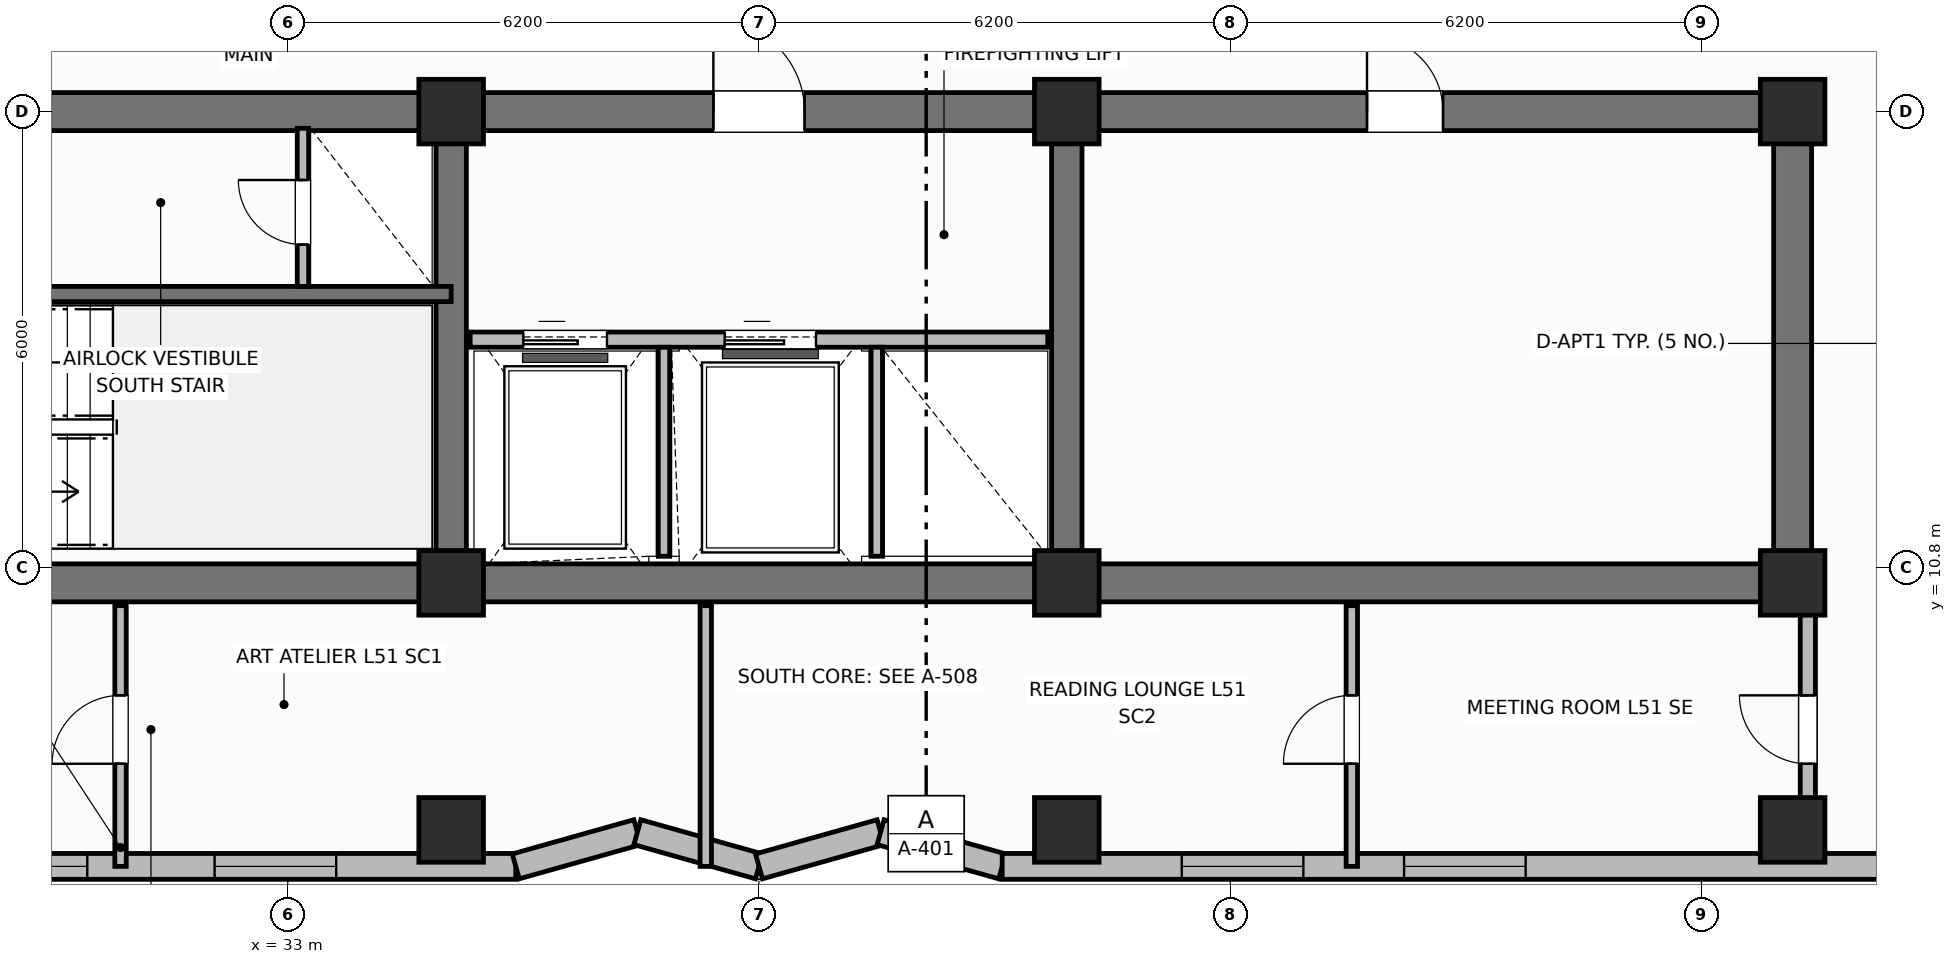
"""IFC4 building model, lengths in metres.
Left out: names, types, materials, properties, quantities, classifications, styles, units other than length and angle.
Written with IfcOpenShell. Run it as: python <this file> out.ifc"""

import sys

from ifc_helpers import new_model, si_unit, direction, frame, frame_2d, origin, origin_2d, place, context, subcontext, project, spatial, rectangle, extrude, element, fill, save


model = new_model("IFC4")
c1 = context("Model", 3, precision=1e-05, world=origin(), true_north=direction((0.0, 1.0)))
c2 = subcontext(c1, "Body", "Model", "MODEL_VIEW")
j1 = project(units=[si_unit("LENGTHUNIT", "METRE"), si_unit("PLANEANGLEUNIT", "RADIAN")], contexts=[c1])
p1 = place(None, origin())
s1 = spatial("IfcSite", under=j1, at=p1, CompositionType="ELEMENT")
p2 = place(p1, origin())
s2 = spatial("IfcBuilding", under=s1, at=p2, CompositionType="ELEMENT")
p3 = place(p2, frame((0.0, 0.0, 207.3)))
s3 = spatial("IfcBuildingStorey", under=s2, at=p3, CompositionType="ELEMENT", Elevation=207.3)
p4 = place(p3, frame((52.8, 10.6, 0.0), z_axis=(0.0, 0.0, 1.0), x_axis=(-1.0, 0.0, 0.0)))
e1 = element("IfcWall", 1, at=p4, inside=s3, PredefinedType="SHEAR", context=c2, shape_type="SweptSolid", body=[
    extrude(rectangle(XDim=27.2, YDim=0.5, at=frame_2d((13.6, 0.0))), origin(), (0.0, 0.0, 1.0), 3.7),
])
p5 = place(p3, frame((52.8, 10.85, 0.0), z_axis=(0.0, 0.0, 1.0), x_axis=(0.0, 1.0, 0.0)))
e2 = element("IfcWall", 2, at=p5, inside=s3, PredefinedType="SHEAR", context=c2, shape_type="SweptSolid", body=[
    extrude(rectangle(XDim=5.7, YDim=0.5, at=frame_2d((2.85, 0.0))), origin(), (0.0, 0.0, 1.0), 3.7),
])
p6 = place(p3, frame((25.6, 16.8, 0.0), z_axis=(0.0, 0.0, 1.0), x_axis=(1.0, 0.0, 0.0)))
e3 = element("IfcWall", 3, at=p6, inside=s3, PredefinedType="SHEAR", context=c2, shape_type="SweptSolid", body=[
    extrude(rectangle(XDim=27.2, YDim=0.5, at=frame_2d((13.6, 0.0))), origin(), (0.0, 0.0, 1.0), 3.7),
])
p7 = place(p6, frame((1.9, 0.0, 0.0)))
e4 = element("IfcOpeningElement", 4, at=p7, cuts=e3, PredefinedType="OPENING", context=c2, shape_type="SweptSolid", body=[
    extrude(rectangle(XDim=1.1, YDim=2.15, at=frame_2d((0.55, 1.075))), frame((0.0, 0.26, 0.0), z_axis=(0.0, -1.0, 0.0), x_axis=(1.0, 0.0, 0.0)), (0.0, 0.0, 1.0), 0.52),
])
p8 = place(p6, frame((13.0, 0.0, 0.0)))
e5 = element("IfcOpeningElement", 5, at=p8, cuts=e3, PredefinedType="OPENING", context=c2, shape_type="SweptSolid", body=[
    extrude(rectangle(XDim=1.2, YDim=2.15, at=frame_2d((0.6, 1.075))), frame((0.0, 0.26, 0.0), z_axis=(0.0, -1.0, 0.0), x_axis=(1.0, 0.0, 0.0)), (0.0, 0.0, 1.0), 0.52),
])
p9 = place(p6, frame((21.6, 0.0, 0.0)))
e6 = element("IfcOpeningElement", 6, at=p9, cuts=e3, PredefinedType="OPENING", context=c2, shape_type="SweptSolid", body=[
    extrude(rectangle(XDim=1.0, YDim=2.15, at=frame_2d((0.5, 1.075))), frame((0.0, 0.26, 0.0), z_axis=(0.0, -1.0, 0.0), x_axis=(1.0, 0.0, 0.0)), (0.0, 0.0, 1.0), 0.52),
])
for number, where, z_axis, x_axis in (
    (7, (35.15, 10.85, 0.0), (0.0, 0.0, 1.0), (0.0, 1.0, 0.0)),
    (8, (43.25, 10.85, 0.0), (0.0, 0.0, 1.0), (0.0, 1.0, 0.0)),
):
    element("IfcWall", number, at=place(p3, frame(where, z_axis=z_axis, x_axis=x_axis)), inside=s3, PredefinedType="SHEAR", context=c2, shape_type="SweptSolid", body=[
        extrude(rectangle(XDim=5.7, YDim=0.4, at=frame_2d((2.85, 0.0))), origin(), (0.0, 0.0, 1.0), 3.7),
    ])
for number, where, z_axis, x_axis in (
    (9, (35.15, 10.6, 0.0), (0.0, 0.0, 1.0), (1.0, 0.0, 0.0)),
    (10, (35.15, 16.8, 0.0), (0.0, 0.0, 1.0), (1.0, 0.0, 0.0)),
    (11, (43.25, 10.6, 0.0), (0.0, 0.0, 1.0), (1.0, 0.0, 0.0)),
    (12, (43.25, 16.8, 0.0), (0.0, 0.0, 1.0), (1.0, 0.0, 0.0)),
    (13, (52.8, 10.6, 0.0), (0.0, 0.0, 1.0), (1.0, 0.0, 0.0)),
    (14, (52.8, 16.8, 0.0), (0.0, 0.0, 1.0), (1.0, 0.0, 0.0)),
    (15, (35.15, 7.35, 0.0), (0.0, 0.0, 1.0), (1.0, 0.0, 0.0)),
    (16, (43.25, 7.35, 0.0), (0.0, 0.0, 1.0), (1.0, 0.0, 0.0)),
    (17, (52.8, 7.35, 0.0), (0.0, 0.0, 1.0), (1.0, 0.0, 0.0)),
):
    element("IfcColumn", number, at=place(p3, frame(where, z_axis=z_axis, x_axis=x_axis)), inside=s3, PredefinedType="COLUMN", context=c2, shape_type="SweptSolid", body=[
        extrude(rectangle(XDim=0.85, YDim=0.85, at=origin_2d()), origin(), (0.0, 0.0, 1.0), 3.7),
    ])
p10 = place(p3, frame((20.2, 6.87, 0.0), z_axis=(0.0, 0.0, 1.0), x_axis=(1.0, 0.0, 0.0)))
e18 = element("IfcWall", 18, at=p10, inside=s3, PredefinedType="SOLIDWALL", context=c2, shape_type="SweptSolid", body=[
    extrude(rectangle(XDim=15.8, YDim=0.34, at=frame_2d((7.9, 0.0))), origin(), (0.0, 0.0, 1.0), 2.72),
])
p11 = place(p10, frame((0.962, 0.0, 0.7)))
e19 = element("IfcOpeningElement", 19, at=p11, cuts=e18, PredefinedType="OPENING", context=c2, shape_type="SweptSolid", body=[
    extrude(rectangle(XDim=1.6, YDim=1.9, at=frame_2d((0.8, 0.95))), frame((0.0, 0.18, 0.0), z_axis=(0.0, -1.0, 0.0), x_axis=(1.0, 0.0, 0.0)), (0.0, 0.0, 1.0), 0.36),
])
p12 = place(p10, frame((8.562, 0.0, 0.7)))
e20 = element("IfcOpeningElement", 20, at=p12, cuts=e18, PredefinedType="OPENING", context=c2, shape_type="SweptSolid", body=[
    extrude(rectangle(XDim=1.6, YDim=1.9, at=frame_2d((0.8, 0.95))), frame((0.0, 0.18, 0.0), z_axis=(0.0, -1.0, 0.0), x_axis=(1.0, 0.0, 0.0)), (0.0, 0.0, 1.0), 0.36),
])
p13 = place(p10, frame((11.837, 0.0, 0.7)))
e21 = element("IfcOpeningElement", 21, at=p13, cuts=e18, PredefinedType="OPENING", context=c2, shape_type="SweptSolid", body=[
    extrude(rectangle(XDim=1.6, YDim=1.9, at=frame_2d((0.8, 0.95))), frame((0.0, 0.18, 0.0), z_axis=(0.0, -1.0, 0.0), x_axis=(1.0, 0.0, 0.0)), (0.0, 0.0, 1.0), 0.36),
])
p14 = place(p3, frame((36.0, 6.87, 0.0), z_axis=(0.0, 0.0, 1.0), x_axis=(0.962662902433, 0.270703040766, 0.0)))
e22 = element("IfcWall", 22, at=p14, inside=s3, PredefinedType="SOLIDWALL", context=c2, shape_type="SweptSolid", body=[
    extrude(rectangle(XDim=1.662, YDim=0.34, at=frame_2d((0.831, 0.0))), origin(), (0.0, 0.0, 1.0), 2.72),
])
p15 = place(p3, frame((37.6, 7.32, 0.0), z_axis=(0.0, 0.0, 1.0), x_axis=(0.962652136636, -0.270741322725, 0.0)))
e23 = element("IfcWall", 23, at=p15, inside=s3, PredefinedType="SOLIDWALL", context=c2, shape_type="SweptSolid", body=[
    extrude(rectangle(XDim=1.662, YDim=0.34, at=frame_2d((0.831, 0.0))), origin(), (0.0, 0.0, 1.0), 2.72),
])
p16 = place(p3, frame((39.2, 6.87, 0.0), z_axis=(0.0, 0.0, 1.0), x_axis=(0.962662902433, 0.270703040766, 0.0)))
e24 = element("IfcWall", 24, at=p16, inside=s3, PredefinedType="SOLIDWALL", context=c2, shape_type="SweptSolid", body=[
    extrude(rectangle(XDim=1.662, YDim=0.34, at=frame_2d((0.831, 0.0))), origin(), (0.0, 0.0, 1.0), 2.72),
])
p17 = place(p3, frame((40.8, 7.32, 0.0), z_axis=(0.0, 0.0, 1.0), x_axis=(0.962652136636, -0.270741322725, 0.0)))
e25 = element("IfcWall", 25, at=p17, inside=s3, PredefinedType="SOLIDWALL", context=c2, shape_type="SweptSolid", body=[
    extrude(rectangle(XDim=1.662, YDim=0.34, at=frame_2d((0.831, 0.0))), origin(), (0.0, 0.0, 1.0), 2.72),
])
p18 = place(p3, frame((42.4, 6.87, 0.0), z_axis=(0.0, 0.0, 1.0), x_axis=(1.0, 0.0, 0.0)))
e26 = element("IfcWall", 26, at=p18, inside=s3, PredefinedType="SOLIDWALL", context=c2, shape_type="SweptSolid", body=[
    extrude(rectangle(XDim=15.8, YDim=0.34, at=frame_2d((7.9, 0.0))), origin(), (0.0, 0.0, 1.0), 2.72),
])
p19 = place(p18, frame((2.363, 0.0, 0.7)))
e27 = element("IfcOpeningElement", 27, at=p19, cuts=e26, PredefinedType="OPENING", context=c2, shape_type="SweptSolid", body=[
    extrude(rectangle(XDim=1.6, YDim=1.9, at=frame_2d((0.8, 0.95))), frame((0.0, 0.18, 0.0), z_axis=(0.0, -1.0, 0.0), x_axis=(1.0, 0.0, 0.0)), (0.0, 0.0, 1.0), 0.36),
])
p20 = place(p18, frame((5.288, 0.0, 0.7)))
e28 = element("IfcOpeningElement", 28, at=p20, cuts=e26, PredefinedType="OPENING", context=c2, shape_type="SweptSolid", body=[
    extrude(rectangle(XDim=1.6, YDim=1.9, at=frame_2d((0.8, 0.95))), frame((0.0, 0.18, 0.0), z_axis=(0.0, -1.0, 0.0), x_axis=(1.0, 0.0, 0.0)), (0.0, 0.0, 1.0), 0.36),
])
p21 = place(p18, frame((13.238, 0.0, 0.7)))
e29 = element("IfcOpeningElement", 29, at=p21, cuts=e26, PredefinedType="OPENING", context=c2, shape_type="SweptSolid", body=[
    extrude(rectangle(XDim=1.6, YDim=1.9, at=frame_2d((0.8, 0.95))), frame((0.0, 0.18, 0.0), z_axis=(0.0, -1.0, 0.0), x_axis=(1.0, 0.0, 0.0)), (0.0, 0.0, 1.0), 0.36),
])
p22 = place(p3, frame((25.6, 14.4, 0.0), z_axis=(0.0, 0.0, 1.0), x_axis=(1.0, 0.0, 0.0)))
e30 = element("IfcWall", 30, at=p22, inside=s3, PredefinedType="SHEAR", context=c2, shape_type="SweptSolid", body=[
    extrude(rectangle(XDim=9.55, YDim=0.2, at=frame_2d((4.775, 0.0))), origin(), (0.0, 0.0, 1.0), 3.7),
])
p23 = place(p22, frame((1.05, 0.0, 0.0)))
e31 = element("IfcOpeningElement", 31, at=p23, cuts=e30, PredefinedType="OPENING", context=c2, shape_type="SweptSolid", body=[
    extrude(rectangle(XDim=1.1, YDim=2.15, at=frame_2d((0.55, 1.075))), frame((0.0, 0.11, 0.0), z_axis=(0.0, -1.0, 0.0), x_axis=(1.0, 0.0, 0.0)), (0.0, 0.0, 1.0), 0.22),
])
p24 = place(p3, frame((33.2, 14.5, 0.0), z_axis=(0.0, 0.0, 1.0), x_axis=(0.0, 1.0, 0.0)))
e32 = element("IfcWall", 32, at=p24, inside=s3, PredefinedType="PARTITIONING", context=c2, shape_type="SweptSolid", body=[
    extrude(rectangle(XDim=2.08, YDim=0.15, at=frame_2d((1.04, 0.0))), origin(), (0.0, 0.0, 1.0), 2.55),
])
p25 = place(p24, frame((0.55, 0.0, 0.0)))
e33 = element("IfcOpeningElement", 33, at=p25, cuts=e32, PredefinedType="OPENING", context=c2, shape_type="SweptSolid", body=[
    extrude(rectangle(XDim=0.85, YDim=2.05, at=frame_2d((0.425, 1.025))), frame((0.0, 0.085, 0.0), z_axis=(0.0, -1.0, 0.0), x_axis=(1.0, 0.0, 0.0)), (0.0, 0.0, 1.0), 0.17),
])
p26 = place(p3, frame((35.4, 13.8, 0.0), z_axis=(0.0, 0.0, 1.0), x_axis=(1.0, 0.0, 0.0)))
e34 = element("IfcWall", 34, at=p26, inside=s3, PredefinedType="PARTITIONING", context=c2, shape_type="SweptSolid", body=[
    extrude(rectangle(XDim=7.6, YDim=0.2, at=frame_2d((3.8, 0.0))), origin(), (0.0, 0.0, 1.0), 2.32),
])
p27 = place(p26, frame((0.7, 0.0, 0.0)))
e35 = element("IfcOpeningElement", 35, at=p27, cuts=e34, PredefinedType="OPENING", context=c2, shape_type="SweptSolid", body=[
    extrude(rectangle(XDim=1.1, YDim=2.15, at=frame_2d((0.55, 1.075))), frame((0.0, 0.11, 0.0), z_axis=(0.0, -1.0, 0.0), x_axis=(1.0, 0.0, 0.0)), (0.0, 0.0, 1.0), 0.22),
])
p28 = place(p26, frame((3.35, 0.0, 0.0)))
e36 = element("IfcOpeningElement", 36, at=p28, cuts=e34, PredefinedType="OPENING", context=c2, shape_type="SweptSolid", body=[
    extrude(rectangle(XDim=1.2, YDim=2.15, at=frame_2d((0.6, 1.075))), frame((0.0, 0.11, 0.0), z_axis=(0.0, -1.0, 0.0), x_axis=(1.0, 0.0, 0.0)), (0.0, 0.0, 1.0), 0.22),
])
for number, where, z_axis, x_axis in (
    (37, (37.95, 10.95, 0.0), (0.0, 0.0, 1.0), (0.0, 1.0, 0.0)),
    (38, (40.75, 10.95, 0.0), (0.0, 0.0, 1.0), (0.0, 1.0, 0.0)),
):
    element("IfcWall", number, at=place(p3, frame(where, z_axis=z_axis, x_axis=x_axis)), inside=s3, PredefinedType="PARTITIONING", context=c2, shape_type="SweptSolid", body=[
        extrude(rectangle(XDim=2.75, YDim=0.15, at=frame_2d((1.375, 0.0))), origin(), (0.0, 0.0, 1.0), 2.55),
    ])
p29 = place(p3, frame((30.8, 6.87, 0.0), z_axis=(0.0, 0.0, 1.0), x_axis=(0.0, 1.0, 0.0)))
e39 = element("IfcWall", 39, at=p29, inside=s3, PredefinedType="PARTITIONING", context=c2, shape_type="SweptSolid", body=[
    extrude(rectangle(XDim=3.43, YDim=0.15, at=frame_2d((1.715, 0.0))), origin(), (0.0, 0.0, 1.0), 2.55),
])
p30 = place(p29, frame((1.35, 0.0, 0.0)))
e40 = element("IfcOpeningElement", 40, at=p30, cuts=e39, PredefinedType="OPENING", context=c2, shape_type="SweptSolid", body=[
    extrude(rectangle(XDim=0.9, YDim=2.1, at=frame_2d((0.45, 1.05))), frame((0.0, 0.085, 0.0), z_axis=(0.0, -1.0, 0.0), x_axis=(1.0, 0.0, 0.0)), (0.0, 0.0, 1.0), 0.17),
])
p31 = place(p3, frame((38.5, 6.87, 0.0), z_axis=(0.0, 0.0, 1.0), x_axis=(0.0, 1.0, 0.0)))
e41 = element("IfcWall", 41, at=p31, inside=s3, PredefinedType="PARTITIONING", context=c2, shape_type="SweptSolid", body=[
    extrude(rectangle(XDim=3.43, YDim=0.15, at=frame_2d((1.715, 0.0))), origin(), (0.0, 0.0, 1.0), 2.55),
])
p32 = place(p3, frame((47.0, 6.87, 0.0), z_axis=(0.0, 0.0, 1.0), x_axis=(0.0, 1.0, 0.0)))
e42 = element("IfcWall", 42, at=p32, inside=s3, PredefinedType="PARTITIONING", context=c2, shape_type="SweptSolid", body=[
    extrude(rectangle(XDim=3.43, YDim=0.15, at=frame_2d((1.715, 0.0))), origin(), (0.0, 0.0, 1.0), 2.55),
])
p33 = place(p32, frame((1.35, 0.0, 0.0)))
e43 = element("IfcOpeningElement", 43, at=p33, cuts=e42, PredefinedType="OPENING", context=c2, shape_type="SweptSolid", body=[
    extrude(rectangle(XDim=0.9, YDim=2.1, at=frame_2d((0.45, 1.05))), frame((0.0, 0.085, 0.0), z_axis=(0.0, -1.0, 0.0), x_axis=(1.0, 0.0, 0.0)), (0.0, 0.0, 1.0), 0.17),
])
p34 = place(p3, frame((53.0, 7.57, 0.0), z_axis=(0.0, 0.0, 1.0), x_axis=(0.0, 1.0, 0.0)))
e44 = element("IfcWall", 44, at=p34, inside=s3, PredefinedType="PARTITIONING", context=c2, shape_type="SweptSolid", body=[
    extrude(rectangle(XDim=2.73, YDim=0.2, at=frame_2d((1.365, 0.0))), origin(), (0.0, 0.0, 1.0), 2.55),
])
p35 = place(p34, frame((0.65, 0.0, 0.0)))
e45 = element("IfcOpeningElement", 45, at=p35, cuts=e44, PredefinedType="OPENING", context=c2, shape_type="SweptSolid", body=[
    extrude(rectangle(XDim=0.9, YDim=2.1, at=frame_2d((0.45, 1.05))), frame((0.0, 0.11, 0.0), z_axis=(0.0, -1.0, 0.0), x_axis=(1.0, 0.0, 0.0)), (0.0, 0.0, 1.0), 0.22),
])
p36 = place(p12, origin())
e46 = element("IfcWindow", 46, at=p36, inside=s3, PartitioningType="SINGLE_PANEL", PredefinedType="WINDOW", context=c2, shape_type="SweptSolid", body=[
    extrude(rectangle(XDim=1.6, YDim=1.9, at=frame_2d((0.8, 0.95))), frame((0.0, 0.03, 0.0), z_axis=(0.0, -1.0, 0.0), x_axis=(1.0, 0.0, 0.0)), (0.0, 0.0, 1.0), 0.06),
])
fill(e20, e46)
p37 = place(p13, origin())
e47 = element("IfcWindow", 47, at=p37, inside=s3, PartitioningType="SINGLE_PANEL", PredefinedType="WINDOW", context=c2, shape_type="SweptSolid", body=[
    extrude(rectangle(XDim=1.6, YDim=1.9, at=frame_2d((0.8, 0.95))), frame((0.0, 0.03, 0.0), z_axis=(0.0, -1.0, 0.0), x_axis=(1.0, 0.0, 0.0)), (0.0, 0.0, 1.0), 0.06),
])
fill(e21, e47)
p38 = place(p19, origin())
e48 = element("IfcWindow", 48, at=p38, inside=s3, PartitioningType="SINGLE_PANEL", PredefinedType="WINDOW", context=c2, shape_type="SweptSolid", body=[
    extrude(rectangle(XDim=1.6, YDim=1.9, at=frame_2d((0.8, 0.95))), frame((0.0, 0.03, 0.0), z_axis=(0.0, -1.0, 0.0), x_axis=(1.0, 0.0, 0.0)), (0.0, 0.0, 1.0), 0.06),
])
fill(e27, e48)
p39 = place(p20, origin())
e49 = element("IfcWindow", 49, at=p39, inside=s3, PartitioningType="SINGLE_PANEL", PredefinedType="WINDOW", context=c2, shape_type="SweptSolid", body=[
    extrude(rectangle(XDim=1.6, YDim=1.9, at=frame_2d((0.8, 0.95))), frame((0.0, 0.03, 0.0), z_axis=(0.0, -1.0, 0.0), x_axis=(1.0, 0.0, 0.0)), (0.0, 0.0, 1.0), 0.06),
])
fill(e28, e49)
p40 = place(p25, origin())
e50 = element("IfcDoor", 50, at=p40, inside=s3, OperationType="SINGLE_SWING_RIGHT", PredefinedType="TRAPDOOR", context=c2, shape_type="SweptSolid", body=[
    extrude(rectangle(XDim=0.85, YDim=2.05, at=frame_2d((0.425, 1.025))), frame((0.0, 0.025, 0.0), z_axis=(0.0, -1.0, 0.0), x_axis=(1.0, 0.0, 0.0)), (0.0, 0.0, 1.0), 0.05),
])
fill(e33, e50)
p41 = place(p27, origin())
e51 = element("IfcDoor", 51, at=p41, inside=s3, OperationType="SLIDING_TO_LEFT", PredefinedType="DOOR", context=c2, shape_type="SweptSolid", body=[
    extrude(rectangle(XDim=1.1, YDim=2.15, at=frame_2d((0.55, 1.075))), frame((0.0, 0.025, 0.0), z_axis=(0.0, -1.0, 0.0), x_axis=(1.0, 0.0, 0.0)), (0.0, 0.0, 1.0), 0.05),
])
fill(e35, e51)
p42 = place(p28, origin())
e52 = element("IfcDoor", 52, at=p42, inside=s3, OperationType="SLIDING_TO_LEFT", PredefinedType="DOOR", context=c2, shape_type="SweptSolid", body=[
    extrude(rectangle(XDim=1.2, YDim=2.15, at=frame_2d((0.6, 1.075))), frame((0.0, 0.025, 0.0), z_axis=(0.0, -1.0, 0.0), x_axis=(1.0, 0.0, 0.0)), (0.0, 0.0, 1.0), 0.05),
])
fill(e36, e52)
p43 = place(p30, origin())
e53 = element("IfcDoor", 53, at=p43, inside=s3, OperationType="SINGLE_SWING_LEFT", PredefinedType="DOOR", context=c2, shape_type="SweptSolid", body=[
    extrude(rectangle(XDim=0.9, YDim=2.1, at=frame_2d((0.45, 1.05))), frame((0.0, 0.025, 0.0), z_axis=(0.0, -1.0, 0.0), x_axis=(1.0, 0.0, 0.0)), (0.0, 0.0, 1.0), 0.05),
])
fill(e40, e53)
p44 = place(p33, origin())
e54 = element("IfcDoor", 54, at=p44, inside=s3, OperationType="SINGLE_SWING_LEFT", PredefinedType="DOOR", context=c2, shape_type="SweptSolid", body=[
    extrude(rectangle(XDim=0.9, YDim=2.1, at=frame_2d((0.45, 1.05))), frame((0.0, 0.025, 0.0), z_axis=(0.0, -1.0, 0.0), x_axis=(1.0, 0.0, 0.0)), (0.0, 0.0, 1.0), 0.05),
])
fill(e43, e54)
p45 = place(p35, origin())
e55 = element("IfcDoor", 55, at=p45, inside=s3, OperationType="SINGLE_SWING_RIGHT", PredefinedType="DOOR", context=c2, shape_type="SweptSolid", body=[
    extrude(rectangle(XDim=0.9, YDim=2.1, at=frame_2d((0.45, 1.05))), frame((0.0, 0.025, 0.0), z_axis=(0.0, -1.0, 0.0), x_axis=(1.0, 0.0, 0.0)), (0.0, 0.0, 1.0), 0.05),
])
fill(e45, e55)
p46 = place(p8, origin())
e56 = element("IfcDoor", 56, at=p46, inside=s3, OperationType="SINGLE_SWING_LEFT", PredefinedType="DOOR", context=c2, shape_type="SweptSolid", body=[
    extrude(rectangle(XDim=1.2, YDim=2.15, at=frame_2d((0.6, 1.075))), frame((0.0, 0.025, 0.0), z_axis=(0.0, -1.0, 0.0), x_axis=(1.0, 0.0, 0.0)), (0.0, 0.0, 1.0), 0.05),
])
fill(e5, e56)
p47 = place(p9, origin())
e57 = element("IfcDoor", 57, at=p47, inside=s3, OperationType="SINGLE_SWING_LEFT", PredefinedType="DOOR", context=c2, shape_type="SweptSolid", body=[
    extrude(rectangle(XDim=1.0, YDim=2.15, at=frame_2d((0.5, 1.075))), frame((0.0, 0.025, 0.0), z_axis=(0.0, -1.0, 0.0), x_axis=(1.0, 0.0, 0.0)), (0.0, 0.0, 1.0), 0.05),
])
fill(e6, e57)
save(model, sys.argv[1])
